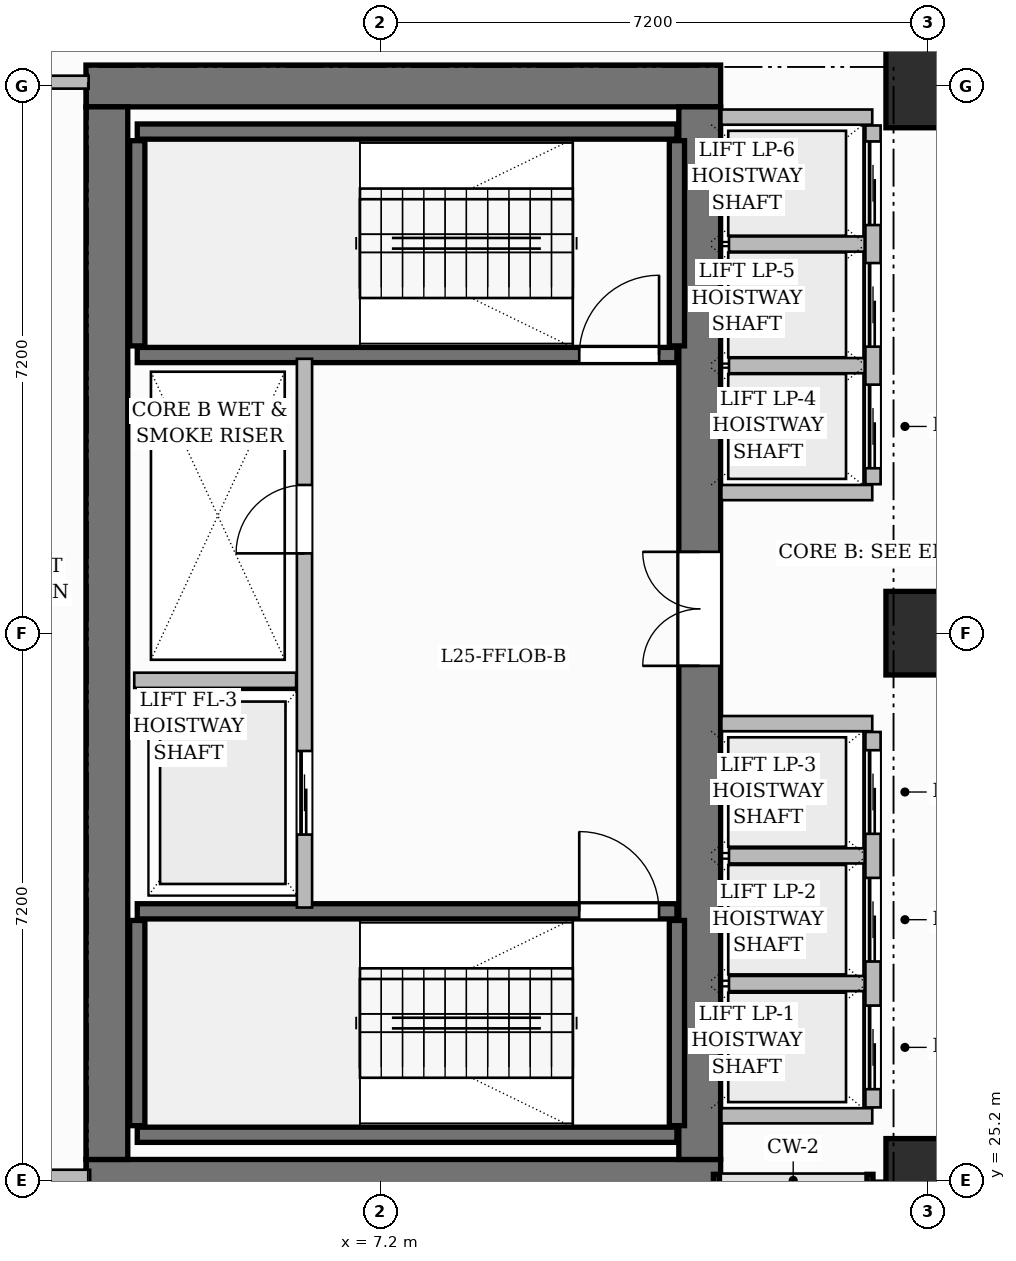
"""IFC4 building model, lengths in metres.
Left out: names, types, materials, properties, quantities, classifications, styles, units other than length and angle.
Written with IfcOpenShell. Run it as: python <this file> out.ifc"""

import sys

from ifc_helpers import new_model, si_unit, direction, frame, frame_2d, origin, origin_2d, place, context, subcontext, project, spatial, rectangle, extrude, source, transform, mapped, element, fill, save


model = new_model("IFC4")
c1 = context("Model", 3, precision=1e-05, world=origin(), true_north=direction((0.0, 1.0)))
c2 = subcontext(c1, "Body", "Model", "MODEL_VIEW")
j1 = project(units=[si_unit("LENGTHUNIT", "METRE"), si_unit("PLANEANGLEUNIT", "RADIAN")], contexts=[c1])
p1 = place(None, origin())
s1 = spatial("IfcSite", under=j1, at=p1, CompositionType="ELEMENT")
p2 = place(p1, origin())
s2 = spatial("IfcBuilding", under=s1, at=p2, CompositionType="ELEMENT")
p3 = place(p2, frame((0.0, 0.0, 102.7)))
s3 = spatial("IfcBuildingStorey", under=s2, at=p3, CompositionType="ELEMENT", Elevation=102.7)
for number, where, z_axis, x_axis in (
    (1, (3.325, 25.2, 0.0), (0.0, 0.0, 1.0), (1.0, 0.0, 0.0)),
    (2, (3.325, 39.6, 0.0), (0.0, 0.0, 1.0), (1.0, 0.0, 0.0)),
):
    element("IfcWall", number, at=place(p3, frame(where, z_axis=z_axis, x_axis=x_axis)), inside=s3, PredefinedType="SHEAR", context=c2, shape_type="SweptSolid", body=[
        extrude(rectangle(XDim=8.35, YDim=0.55, at=frame_2d((4.175, 0.0))), origin(), (0.0, 0.0, 1.0), 3.7),
    ])
p4 = place(p3, frame((3.6, 25.475, 0.0), z_axis=(0.0, 0.0, 1.0), x_axis=(0.0, 1.0, 0.0)))
e3 = element("IfcWall", 3, at=p4, inside=s3, PredefinedType="SHEAR", context=c2, shape_type="SweptSolid", body=[
    extrude(rectangle(XDim=13.85, YDim=0.55, at=frame_2d((6.925, 0.0))), origin(), (0.0, 0.0, 1.0), 3.7),
])
p5 = place(p3, frame((11.4, 25.475, 0.0), z_axis=(0.0, 0.0, 1.0), x_axis=(0.0, 1.0, 0.0)))
e4 = element("IfcWall", 4, at=p5, inside=s3, PredefinedType="SHEAR", context=c2, shape_type="SweptSolid", body=[
    extrude(rectangle(XDim=13.85, YDim=0.55, at=frame_2d((6.925, 0.0))), origin(), (0.0, 0.0, 1.0), 3.7),
])
p6 = place(p5, frame((6.495, 0.0, 0.0)))
e5 = element("IfcOpeningElement", 5, at=p6, cuts=e4, PredefinedType="OPENING", context=c2, shape_type="SweptSolid", body=[
    extrude(rectangle(XDim=1.5, YDim=2.2, at=frame_2d((0.75, 1.1))), frame((0.0, 0.285, 0.0), z_axis=(0.0, -1.0, 0.0), x_axis=(1.0, 0.0, 0.0)), (0.0, 0.0, 1.0), 0.57),
])
m1 = source(origin(), c2, "Body", "SweptSolid", [
    extrude(rectangle(XDim=1.1, YDim=1.1, at=origin_2d()), origin(), (0.0, 0.0, 1.0), 3.7),
])
for number, where, z_axis, x_axis in (
    (6, (14.4, 25.2, 0.0), (0.0, 0.0, 1.0), (1.0, 0.0, 0.0)),
    (7, (14.4, 32.4, 0.0), (0.0, 0.0, 1.0), (1.0, 0.0, 0.0)),
    (8, (14.4, 39.6, 0.0), (0.0, 0.0, 1.0), (1.0, 0.0, 0.0)),
):
    element("IfcColumn", number, at=place(p3, frame(where, z_axis=z_axis, x_axis=x_axis)), inside=s3, PredefinedType="COLUMN", context=c2, shape_type="MappedRepresentation", body=[
        mapped(m1, transform((0.0, 0.0, 0.0), scale=1.0)),
    ])
p7 = place(p3, frame((4.0, 25.8, 0.0), z_axis=(0.0, 0.0, 1.0), x_axis=(1.0, 0.0, 0.0)))
e9 = element("IfcWall", 9, at=p7, inside=s3, PredefinedType="SHEAR", context=c2, shape_type="SweptSolid", body=[
    extrude(rectangle(XDim=7.1, YDim=0.2, at=frame_2d((3.55, 0.0))), origin(), (0.0, 0.0, 1.0), 3.7),
])
for number, where, z_axis, x_axis in (
    (10, (4.0, 25.92, 0.0), (0.0, 0.0, 1.0), (0.0, 1.0, 0.0)),
    (11, (11.1, 25.92, 0.0), (0.0, 0.0, 1.0), (0.0, 1.0, 0.0)),
):
    element("IfcWall", number, at=place(p3, frame(where, z_axis=z_axis, x_axis=x_axis)), inside=s3, PredefinedType="SHEAR", context=c2, shape_type="SweptSolid", body=[
        extrude(rectangle(XDim=2.7, YDim=0.2, at=frame_2d((1.35, 0.0))), origin(), (0.0, 0.0, 1.0), 3.7),
    ])
p8 = place(p3, frame((4.0, 28.74, 0.0), z_axis=(0.0, 0.0, 1.0), x_axis=(1.0, 0.0, 0.0)))
e12 = element("IfcWall", 12, at=p8, inside=s3, PredefinedType="SHEAR", context=c2, shape_type="SweptSolid", body=[
    extrude(rectangle(XDim=7.1, YDim=0.2, at=frame_2d((3.55, 0.0))), origin(), (0.0, 0.0, 1.0), 3.7),
])
p9 = place(p8, frame((5.815, 0.0, 0.0)))
e13 = element("IfcOpeningElement", 13, at=p9, cuts=e12, PredefinedType="OPENING", context=c2, shape_type="SweptSolid", body=[
    extrude(rectangle(XDim=1.05, YDim=2.2, at=frame_2d((0.525, 1.1))), frame((0.0, 0.11, 0.0), z_axis=(0.0, -1.0, 0.0), x_axis=(1.0, 0.0, 0.0)), (0.0, 0.0, 1.0), 0.22),
])
p10 = place(p3, frame((4.0, 39.0, 0.0), z_axis=(0.0, 0.0, 1.0), x_axis=(1.0, 0.0, 0.0)))
e14 = element("IfcWall", 14, at=p10, inside=s3, PredefinedType="SHEAR", context=c2, shape_type="SweptSolid", body=[
    extrude(rectangle(XDim=7.1, YDim=0.2, at=frame_2d((3.55, 0.0))), origin(), (0.0, 0.0, 1.0), 3.7),
])
for number, where, z_axis, x_axis in (
    (15, (4.0, 36.18, 0.0), (0.0, 0.0, 1.0), (0.0, 1.0, 0.0)),
    (16, (11.1, 36.18, 0.0), (0.0, 0.0, 1.0), (0.0, 1.0, 0.0)),
):
    element("IfcWall", number, at=place(p3, frame(where, z_axis=z_axis, x_axis=x_axis)), inside=s3, PredefinedType="SHEAR", context=c2, shape_type="SweptSolid", body=[
        extrude(rectangle(XDim=2.7, YDim=0.2, at=frame_2d((1.35, 0.0))), origin(), (0.0, 0.0, 1.0), 3.7),
    ])
p11 = place(p3, frame((4.0, 36.06, 0.0), z_axis=(0.0, 0.0, 1.0), x_axis=(1.0, 0.0, 0.0)))
e17 = element("IfcWall", 17, at=p11, inside=s3, PredefinedType="SHEAR", context=c2, shape_type="SweptSolid", body=[
    extrude(rectangle(XDim=7.1, YDim=0.2, at=frame_2d((3.55, 0.0))), origin(), (0.0, 0.0, 1.0), 3.7),
])
p12 = place(p11, frame((5.815, 0.0, 0.0)))
e18 = element("IfcOpeningElement", 18, at=p12, cuts=e17, PredefinedType="OPENING", context=c2, shape_type="SweptSolid", body=[
    extrude(rectangle(XDim=1.05, YDim=2.2, at=frame_2d((0.525, 1.1))), frame((0.0, 0.11, 0.0), z_axis=(0.0, -1.0, 0.0), x_axis=(1.0, 0.0, 0.0)), (0.0, 0.0, 1.0), 0.22),
])
p13 = place(p3, frame((6.2, 28.79, 0.0), z_axis=(0.0, 0.0, 1.0), x_axis=(0.0, 1.0, 0.0)))
e19 = element("IfcWall", 19, at=p13, inside=s3, PredefinedType="PARTITIONING", context=c2, shape_type="SweptSolid", body=[
    extrude(rectangle(XDim=7.22, YDim=0.2, at=frame_2d((3.61, 0.0))), origin(), (0.0, 0.0, 1.0), 3.4),
])
p14 = place(p13, frame((4.66, 0.0, 0.0)))
e20 = element("IfcOpeningElement", 20, at=p14, cuts=e19, PredefinedType="OPENING", context=c2, shape_type="SweptSolid", body=[
    extrude(rectangle(XDim=0.9, YDim=2.1, at=frame_2d((0.45, 1.05))), frame((0.0, 0.11, 0.0), z_axis=(0.0, -1.0, 0.0), x_axis=(1.0, 0.0, 0.0)), (0.0, 0.0, 1.0), 0.22),
])
p15 = place(p13, frame((0.96, 0.0, 0.0)))
e21 = element("IfcOpeningElement", 21, at=p15, cuts=e19, PredefinedType="OPENING", context=c2, shape_type="SweptSolid", body=[
    extrude(rectangle(XDim=1.1, YDim=2.2, at=frame_2d((0.55, 1.1))), frame((0.0, 0.11, 0.0), z_axis=(0.0, -1.0, 0.0), x_axis=(1.0, 0.0, 0.0)), (0.0, 0.0, 1.0), 0.22),
])
p16 = place(p3, frame((3.96, 31.78, 0.0), z_axis=(0.0, 0.0, 1.0), x_axis=(1.0, 0.0, 0.0)))
e22 = element("IfcWall", 22, at=p16, inside=s3, PredefinedType="PARTITIONING", context=c2, shape_type="SweptSolid", body=[
    extrude(rectangle(XDim=2.13, YDim=0.2, at=frame_2d((1.065, 0.0))), origin(), (0.0, 0.0, 1.0), 3.4),
])
for number, where, z_axis, x_axis in (
    (23, (11.685, 26.05, 0.0), (0.0, 0.0, 1.0), (1.0, 0.0, 0.0)),
    (24, (11.685, 31.21, 0.0), (0.0, 0.0, 1.0), (1.0, 0.0, 0.0)),
):
    element("IfcWall", number, at=place(p3, frame(where, z_axis=z_axis, x_axis=x_axis)), inside=s3, PredefinedType="PARTITIONING", context=c2, shape_type="SweptSolid", body=[
        extrude(rectangle(XDim=1.985, YDim=0.2, at=frame_2d((0.992, 0.0))), origin(), (0.0, 0.0, 1.0), 3.4),
    ])
p17 = place(p3, frame((13.68, 26.16, 0.0), z_axis=(0.0, 0.0, 1.0), x_axis=(0.0, 1.0, 0.0)))
e25 = element("IfcWall", 25, at=p17, inside=s3, PredefinedType="PARTITIONING", context=c2, shape_type="SweptSolid", body=[
    extrude(rectangle(XDim=4.94, YDim=0.2, at=frame_2d((2.47, 0.0))), origin(), (0.0, 0.0, 1.0), 3.4),
])
p18 = place(p17, frame((0.24, 0.0, 0.0)))
e26 = element("IfcOpeningElement", 26, at=p18, cuts=e25, PredefinedType="OPENING", context=c2, shape_type="SweptSolid", body=[
    extrude(rectangle(XDim=1.1, YDim=2.2, at=frame_2d((0.55, 1.1))), frame((0.0, 0.11, 0.0), z_axis=(0.0, -1.0, 0.0), x_axis=(1.0, 0.0, 0.0)), (0.0, 0.0, 1.0), 0.22),
])
p19 = place(p17, frame((1.92, 0.0, 0.0)))
e27 = element("IfcOpeningElement", 27, at=p19, cuts=e25, PredefinedType="OPENING", context=c2, shape_type="SweptSolid", body=[
    extrude(rectangle(XDim=1.1, YDim=2.2, at=frame_2d((0.55, 1.1))), frame((0.0, 0.11, 0.0), z_axis=(0.0, -1.0, 0.0), x_axis=(1.0, 0.0, 0.0)), (0.0, 0.0, 1.0), 0.22),
])
p20 = place(p17, frame((3.6, 0.0, 0.0)))
e28 = element("IfcOpeningElement", 28, at=p20, cuts=e25, PredefinedType="OPENING", context=c2, shape_type="SweptSolid", body=[
    extrude(rectangle(XDim=1.1, YDim=2.2, at=frame_2d((0.55, 1.1))), frame((0.0, 0.11, 0.0), z_axis=(0.0, -1.0, 0.0), x_axis=(1.0, 0.0, 0.0)), (0.0, 0.0, 1.0), 0.22),
])
for number, where, z_axis, x_axis in (
    (29, (11.785, 27.79, 0.0), (0.0, 0.0, 1.0), (1.0, 0.0, 0.0)),
    (30, (11.785, 29.47, 0.0), (0.0, 0.0, 1.0), (1.0, 0.0, 0.0)),
):
    element("IfcWall", number, at=place(p3, frame(where, z_axis=z_axis, x_axis=x_axis)), inside=s3, PredefinedType="PARTITIONING", context=c2, shape_type="SweptSolid", body=[
        extrude(rectangle(XDim=1.785, YDim=0.2, at=frame_2d((0.893, 0.0))), origin(), (0.0, 0.0, 1.0), 3.4),
    ])
for number, where, z_axis, x_axis in (
    (31, (11.685, 34.25, 0.0), (0.0, 0.0, 1.0), (1.0, 0.0, 0.0)),
    (32, (11.685, 39.19, 0.0), (0.0, 0.0, 1.0), (1.0, 0.0, 0.0)),
):
    element("IfcWall", number, at=place(p3, frame(where, z_axis=z_axis, x_axis=x_axis)), inside=s3, PredefinedType="PARTITIONING", context=c2, shape_type="SweptSolid", body=[
        extrude(rectangle(XDim=1.985, YDim=0.2, at=frame_2d((0.992, 0.0))), origin(), (0.0, 0.0, 1.0), 3.4),
    ])
p21 = place(p3, frame((13.68, 34.36, 0.0), z_axis=(0.0, 0.0, 1.0), x_axis=(0.0, 1.0, 0.0)))
e33 = element("IfcWall", 33, at=p21, inside=s3, PredefinedType="PARTITIONING", context=c2, shape_type="SweptSolid", body=[
    extrude(rectangle(XDim=4.72, YDim=0.2, at=frame_2d((2.36, 0.0))), origin(), (0.0, 0.0, 1.0), 3.4),
])
p22 = place(p21, frame((0.21, 0.0, 0.0)))
e34 = element("IfcOpeningElement", 34, at=p22, cuts=e33, PredefinedType="OPENING", context=c2, shape_type="SweptSolid", body=[
    extrude(rectangle(XDim=1.1, YDim=2.2, at=frame_2d((0.55, 1.1))), frame((0.0, 0.11, 0.0), z_axis=(0.0, -1.0, 0.0), x_axis=(1.0, 0.0, 0.0)), (0.0, 0.0, 1.0), 0.22),
])
p23 = place(p21, frame((1.81, 0.0, 0.0)))
e35 = element("IfcOpeningElement", 35, at=p23, cuts=e33, PredefinedType="OPENING", context=c2, shape_type="SweptSolid", body=[
    extrude(rectangle(XDim=1.1, YDim=2.2, at=frame_2d((0.55, 1.1))), frame((0.0, 0.11, 0.0), z_axis=(0.0, -1.0, 0.0), x_axis=(1.0, 0.0, 0.0)), (0.0, 0.0, 1.0), 0.22),
])
p24 = place(p21, frame((3.41, 0.0, 0.0)))
e36 = element("IfcOpeningElement", 36, at=p24, cuts=e33, PredefinedType="OPENING", context=c2, shape_type="SweptSolid", body=[
    extrude(rectangle(XDim=1.1, YDim=2.2, at=frame_2d((0.55, 1.1))), frame((0.0, 0.11, 0.0), z_axis=(0.0, -1.0, 0.0), x_axis=(1.0, 0.0, 0.0)), (0.0, 0.0, 1.0), 0.22),
])
for number, where, z_axis, x_axis in (
    (37, (11.785, 35.92, 0.0), (0.0, 0.0, 1.0), (1.0, 0.0, 0.0)),
    (38, (11.785, 37.52, 0.0), (0.0, 0.0, 1.0), (1.0, 0.0, 0.0)),
):
    element("IfcWall", number, at=place(p3, frame(where, z_axis=z_axis, x_axis=x_axis)), inside=s3, PredefinedType="PARTITIONING", context=c2, shape_type="SweptSolid", body=[
        extrude(rectangle(XDim=1.785, YDim=0.2, at=frame_2d((0.893, 0.0))), origin(), (0.0, 0.0, 1.0), 3.4),
    ])
p25 = place(p3, frame((0.24, 39.65, 0.0), z_axis=(0.0, 0.0, 1.0), x_axis=(1.0, 0.0, 0.0)))
e39 = element("IfcWall", 39, at=p25, inside=s3, PredefinedType="PARTITIONING", context=c2, shape_type="SweptSolid", body=[
    extrude(rectangle(XDim=3.12, YDim=0.17, at=frame_2d((1.56, 0.0))), origin(), (0.0, 0.0, 1.0), 3.4),
])
p26 = place(p25, frame((1.11, 0.0, 0.0)))
e40 = element("IfcOpeningElement", 40, at=p26, cuts=e39, PredefinedType="OPENING", context=c2, shape_type="SweptSolid", body=[
    extrude(rectangle(XDim=0.9, YDim=2.15, at=frame_2d((0.45, 1.075))), frame((0.0, 0.095, 0.0), z_axis=(0.0, -1.0, 0.0), x_axis=(1.0, 0.0, 0.0)), (0.0, 0.0, 1.0), 0.19),
])
p27 = place(p3, frame((0.0, 25.2, 0.0), z_axis=(0.0, 0.0, 1.0), x_axis=(1.0, 0.0, 0.0)))
e41 = element("IfcWall", 41, at=p27, inside=s3, PredefinedType="SOLIDWALL", context=c2, shape_type="SweptSolid", body=[
    extrude(rectangle(XDim=3.38, YDim=0.28, at=frame_2d((1.69, 0.0))), origin(), (0.0, 0.0, 1.0), 3.4),
])
p28 = place(p27, frame((1.205, 0.0, 0.8)))
e42 = element("IfcOpeningElement", 42, at=p28, cuts=e41, PredefinedType="OPENING", context=c2, shape_type="SweptSolid", body=[
    extrude(rectangle(XDim=1.4, YDim=1.85, at=frame_2d((0.7, 0.925))), frame((0.0, 0.15, 0.0), z_axis=(0.0, -1.0, 0.0), x_axis=(1.0, 0.0, 0.0)), (0.0, 0.0, 1.0), 0.3),
])
m2 = source(origin(), c2, "Body", "SweptSolid", [
    extrude(rectangle(XDim=1.05, YDim=2.2, at=frame_2d((0.525, 1.1))), frame((0.0, 0.025, 0.0), z_axis=(0.0, -1.0, 0.0), x_axis=(1.0, 0.0, 0.0)), (0.0, 0.0, 1.0), 0.05),
])
p29 = place(p9, origin())
e43 = element("IfcDoor", 43, at=p29, inside=s3, OperationType="SINGLE_SWING_LEFT", PredefinedType="DOOR", context=c2, shape_type="MappedRepresentation", body=[
    mapped(m2, transform((0.0, 0.0, 0.0), scale=1.0)),
])
fill(e13, e43)
p30 = place(p12, origin())
e44 = element("IfcDoor", 44, at=p30, inside=s3, OperationType="SINGLE_SWING_RIGHT", PredefinedType="DOOR", context=c2, shape_type="MappedRepresentation", body=[
    mapped(m2, transform((0.0, 0.0, 0.0), scale=1.0)),
])
fill(e18, e44)
m3 = source(origin(), c2, "Body", "SweptSolid", [
    extrude(rectangle(XDim=0.9, YDim=2.1, at=frame_2d((0.45, 1.05))), frame((0.0, 0.025, 0.0), z_axis=(0.0, -1.0, 0.0), x_axis=(1.0, 0.0, 0.0)), (0.0, 0.0, 1.0), 0.05),
])
p31 = place(p14, origin())
e45 = element("IfcDoor", 45, at=p31, inside=s3, OperationType="SINGLE_SWING_LEFT", PredefinedType="DOOR", context=c2, shape_type="MappedRepresentation", body=[
    mapped(m3, transform((0.0, 0.0, 0.0), scale=1.0)),
])
fill(e20, e45)
m4 = source(origin(), c2, "Body", "SweptSolid", [
    extrude(rectangle(XDim=1.5, YDim=2.2, at=frame_2d((0.75, 1.1))), frame((0.0, 0.025, 0.0), z_axis=(0.0, -1.0, 0.0), x_axis=(1.0, 0.0, 0.0)), (0.0, 0.0, 1.0), 0.05),
])
p32 = place(p6, origin())
e46 = element("IfcDoor", 46, at=p32, inside=s3, OperationType="DOUBLE_DOOR_SINGLE_SWING", PredefinedType="DOOR", context=c2, shape_type="MappedRepresentation", body=[
    mapped(m4, transform((0.0, 0.0, 0.0), scale=1.0)),
])
fill(e5, e46)
m5 = source(origin(), c2, "Body", "SweptSolid", [
    extrude(rectangle(XDim=1.1, YDim=2.2, at=frame_2d((0.55, 1.1))), frame((0.0, 0.025, 0.0), z_axis=(0.0, -1.0, 0.0), x_axis=(1.0, 0.0, 0.0)), (0.0, 0.0, 1.0), 0.05),
])
p33 = place(p15, origin())
e47 = element("IfcDoor", 47, at=p33, inside=s3, OperationType="SLIDING_TO_LEFT", PredefinedType="DOOR", context=c2, shape_type="MappedRepresentation", body=[
    mapped(m5, transform((0.0, 0.0, 0.0), scale=1.0)),
])
fill(e21, e47)
p34 = place(p18, origin())
e48 = element("IfcDoor", 48, at=p34, inside=s3, OperationType="SLIDING_TO_LEFT", PredefinedType="DOOR", context=c2, shape_type="MappedRepresentation", body=[
    mapped(m5, transform((0.0, 0.0, 0.0), scale=1.0)),
])
fill(e26, e48)
p35 = place(p19, origin())
e49 = element("IfcDoor", 49, at=p35, inside=s3, OperationType="SLIDING_TO_LEFT", PredefinedType="DOOR", context=c2, shape_type="MappedRepresentation", body=[
    mapped(m5, transform((0.0, 0.0, 0.0), scale=1.0)),
])
fill(e27, e49)
p36 = place(p20, origin())
e50 = element("IfcDoor", 50, at=p36, inside=s3, OperationType="SLIDING_TO_LEFT", PredefinedType="DOOR", context=c2, shape_type="MappedRepresentation", body=[
    mapped(m5, transform((0.0, 0.0, 0.0), scale=1.0)),
])
fill(e28, e50)
p37 = place(p22, origin())
e51 = element("IfcDoor", 51, at=p37, inside=s3, OperationType="SLIDING_TO_LEFT", PredefinedType="DOOR", context=c2, shape_type="MappedRepresentation", body=[
    mapped(m5, transform((0.0, 0.0, 0.0), scale=1.0)),
])
fill(e34, e51)
p38 = place(p23, origin())
e52 = element("IfcDoor", 52, at=p38, inside=s3, OperationType="SLIDING_TO_LEFT", PredefinedType="DOOR", context=c2, shape_type="MappedRepresentation", body=[
    mapped(m5, transform((0.0, 0.0, 0.0), scale=1.0)),
])
fill(e35, e52)
p39 = place(p24, origin())
e53 = element("IfcDoor", 53, at=p39, inside=s3, OperationType="SLIDING_TO_LEFT", PredefinedType="DOOR", context=c2, shape_type="MappedRepresentation", body=[
    mapped(m5, transform((0.0, 0.0, 0.0), scale=1.0)),
])
fill(e36, e53)
save(model, sys.argv[1])
